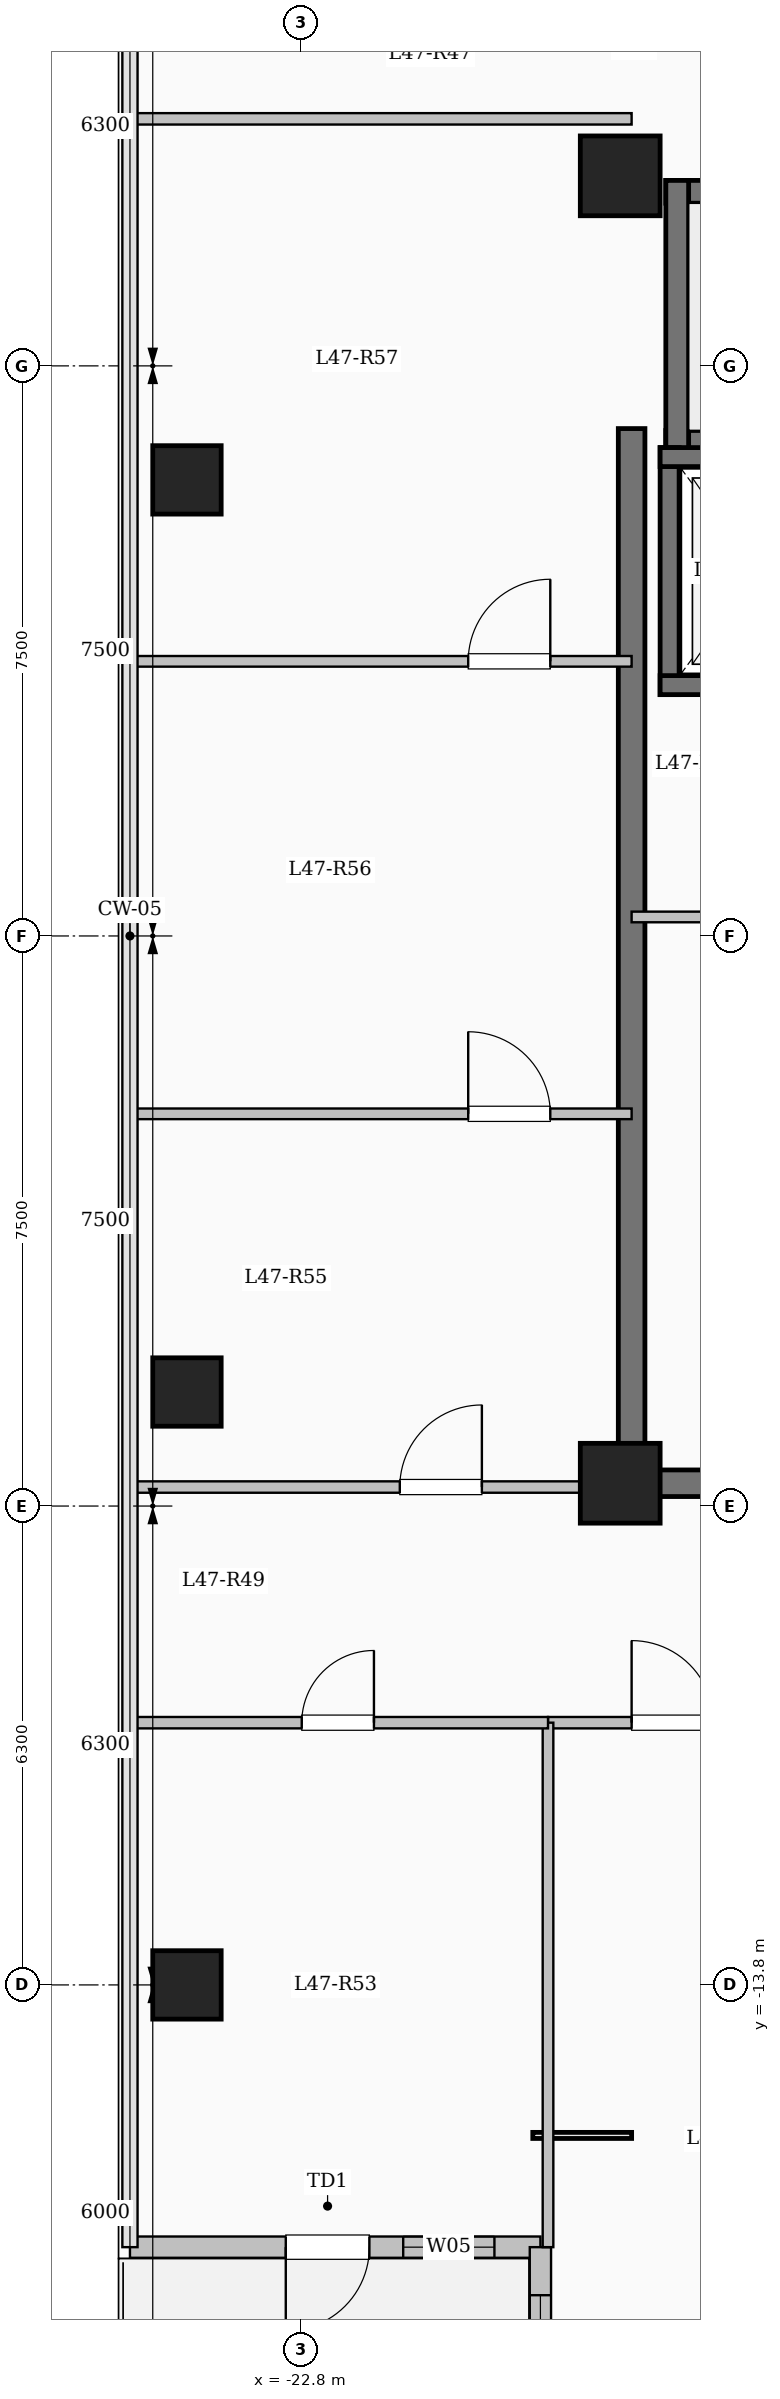
"""IFC4 building model, lengths in metres.
Left out: names, types, materials, properties, quantities, classifications, styles, units other than length and angle.
Written with IfcOpenShell. Run it as: python <this file> out.ifc"""

import sys

from ifc_helpers import new_model, si_unit, direction, frame, frame_2d, origin, origin_2d, place, context, subcontext, project, spatial, rectangle, extrude, element, fill, save


model = new_model("IFC4")
c1 = context("Model", 3, precision=1e-05, world=origin(), true_north=direction((0.0, 1.0)))
c2 = subcontext(c1, "Body", "Model", "MODEL_VIEW")
j1 = project(units=[si_unit("LENGTHUNIT", "METRE"), si_unit("PLANEANGLEUNIT", "RADIAN")], contexts=[c1])
p1 = place(None, origin())
s1 = spatial("IfcSite", under=j1, at=p1, CompositionType="ELEMENT")
p2 = place(p1, origin())
s2 = spatial("IfcBuilding", under=s1, at=p2, CompositionType="ELEMENT")
p3 = place(p2, frame((0.0, 0.0, 172.8)))
s3 = spatial("IfcBuildingStorey", under=s2, at=p3, CompositionType="ELEMENT", Elevation=172.8)
for number, where, z_axis, x_axis in (
    (1, (-18.6, -7.2, 0.0), (0.0, 0.0, 1.0), (1.0, 0.0, 0.0)),
    (2, (-18.6, 10.0, 0.0), (0.0, 0.0, 1.0), (1.0, 0.0, 0.0)),
):
    element("IfcColumn", number, at=place(p3, frame(where, z_axis=z_axis, x_axis=x_axis)), inside=s3, PredefinedType="COLUMN", context=c2, shape_type="SweptSolid", body=[
        extrude(rectangle(XDim=1.05, YDim=1.05, at=origin_2d()), origin(), (0.0, 0.0, 1.0), 4.5),
    ])
for number, where, z_axis, x_axis in (
    (3, (-24.3, -13.8, 0.0), (0.0, 0.0, 1.0), (1.0, 0.0, 0.0)),
    (4, (-24.3, -6.0, 0.0), (0.0, 0.0, 1.0), (1.0, 0.0, 0.0)),
    (5, (-24.3, 6.0, 0.0), (0.0, 0.0, 1.0), (1.0, 0.0, 0.0)),
):
    element("IfcColumn", number, at=place(p3, frame(where, z_axis=z_axis, x_axis=x_axis)), inside=s3, PredefinedType="COLUMN", context=c2, shape_type="SweptSolid", body=[
        extrude(rectangle(XDim=0.9, YDim=0.9, at=origin_2d()), origin(), (0.0, 0.0, 1.0), 4.5),
    ])
p4 = place(p3, frame((-19.65, -17.25, 0.0), z_axis=(0.0, 0.0, 1.0), x_axis=(-1.0, 0.0, 0.0)))
e6 = element("IfcWall", 6, at=p4, inside=s3, PredefinedType="SOLIDWALL", context=c2, shape_type="SweptSolid", body=[
    extrude(rectangle(XDim=5.4, YDim=0.28, at=frame_2d((2.7, 0.0))), origin(), (0.0, 0.0, 1.0), 4.2),
])
p5 = place(p4, frame((2.25, 0.0, 0.0)))
e7 = element("IfcOpeningElement", 7, at=p5, cuts=e6, PredefinedType="OPENING", context=c2, shape_type="SweptSolid", body=[
    extrude(rectangle(XDim=1.1, YDim=2.2, at=frame_2d((0.55, 1.1))), frame((0.0, 0.15, 0.0), z_axis=(0.0, -1.0, 0.0), x_axis=(1.0, 0.0, 0.0)), (0.0, 0.0, 1.0), 0.3),
])
p6 = place(p4, frame((0.605, 0.0, 0.95)))
e8 = element("IfcOpeningElement", 8, at=p6, cuts=e6, PredefinedType="OPENING", context=c2, shape_type="SweptSolid", body=[
    extrude(rectangle(XDim=1.2, YDim=1.5, at=frame_2d((0.6, 0.75))), frame((0.0, 0.15, 0.0), z_axis=(0.0, -1.0, 0.0), x_axis=(1.0, 0.0, 0.0)), (0.0, 0.0, 1.0), 0.3),
])
p7 = place(p3, frame((-19.65, -21.15, 0.0), z_axis=(0.0, 0.0, 1.0), x_axis=(0.0, 1.0, 0.0)))
e9 = element("IfcWall", 9, at=p7, inside=s3, PredefinedType="SOLIDWALL", context=c2, shape_type="SweptSolid", body=[
    extrude(rectangle(XDim=3.9, YDim=0.28, at=frame_2d((1.95, 0.0))), origin(), (0.0, 0.0, 1.0), 4.2),
])
p8 = place(p7, frame((0.668, 0.0, 0.85)))
e10 = element("IfcOpeningElement", 10, at=p8, cuts=e9, PredefinedType="OPENING", context=c2, shape_type="SweptSolid", body=[
    extrude(rectangle(XDim=2.6, YDim=2.4, at=frame_2d((1.3, 1.2))), frame((0.0, 0.15, 0.0), z_axis=(0.0, -1.0, 0.0), x_axis=(1.0, 0.0, 0.0)), (0.0, 0.0, 1.0), 0.3),
])
p9 = place(p3, frame((-18.0, 9.79, 0.0), z_axis=(0.0, 0.0, 1.0), x_axis=(1.0, 0.0, 0.0)))
e11 = element("IfcWall", 11, at=p9, inside=s3, PredefinedType="SHEAR", context=c2, shape_type="SweptSolid", body=[
    extrude(rectangle(XDim=8.0, YDim=0.3, at=frame_2d((4.0, 0.0))), origin(), (0.0, 0.0, 1.0), 4.5),
])
p10 = place(p3, frame((-18.0, 6.5, 0.0), z_axis=(0.0, 0.0, 1.0), x_axis=(1.0, 0.0, 0.0)))
e12 = element("IfcWall", 12, at=p10, inside=s3, PredefinedType="SHEAR", context=c2, shape_type="SweptSolid", body=[
    extrude(rectangle(XDim=8.0, YDim=0.3, at=frame_2d((4.0, 0.0))), origin(), (0.0, 0.0, 1.0), 4.5),
])
p11 = place(p10, frame((6.45, 0.0, 0.0)))
e13 = element("IfcOpeningElement", 13, at=p11, cuts=e12, PredefinedType="OPENING", context=c2, shape_type="SweptSolid", body=[
    extrude(rectangle(XDim=1.0, YDim=2.15, at=frame_2d((0.5, 1.075))), frame((0.0, 0.16, 0.0), z_axis=(0.0, -1.0, 0.0), x_axis=(1.0, 0.0, 0.0)), (0.0, 0.0, 1.0), 0.32),
])
p12 = place(p3, frame((-17.85, 6.35, 0.0), z_axis=(0.0, 0.0, 1.0), x_axis=(0.0, 1.0, 0.0)))
e14 = element("IfcWall", 14, at=p12, inside=s3, PredefinedType="SHEAR", context=c2, shape_type="SweptSolid", body=[
    extrude(rectangle(XDim=3.59, YDim=0.3, at=frame_2d((1.795, 0.0))), origin(), (0.0, 0.0, 1.0), 4.5),
])
p13 = place(p3, frame((-17.95, 3.175, 0.0), z_axis=(0.0, 0.0, 1.0), x_axis=(0.0, 1.0, 0.0)))
e15 = element("IfcWall", 15, at=p13, inside=s3, PredefinedType="SHEAR", context=c2, shape_type="SweptSolid", body=[
    extrude(rectangle(XDim=3.25, YDim=0.25, at=frame_2d((1.625, 0.0))), origin(), (0.0, 0.0, 1.0), 4.5),
])
for number, where, z_axis, x_axis in (
    (16, (-18.075, 3.3, 0.0), (0.0, 0.0, 1.0), (1.0, 0.0, 0.0)),
    (17, (-18.075, 6.3, 0.0), (0.0, 0.0, 1.0), (1.0, 0.0, 0.0)),
):
    element("IfcWall", number, at=place(p3, frame(where, z_axis=z_axis, x_axis=x_axis)), inside=s3, PredefinedType="SHEAR", context=c2, shape_type="SweptSolid", body=[
        extrude(rectangle(XDim=2.55, YDim=0.25, at=frame_2d((1.275, 0.0))), origin(), (0.0, 0.0, 1.0), 4.5),
    ])
p14 = place(p3, frame((-18.45, -7.375, 0.0), z_axis=(0.0, 0.0, 1.0), x_axis=(0.0, 1.0, 0.0)))
e18 = element("IfcWall", 18, at=p14, inside=s3, PredefinedType="SHEAR", context=c2, shape_type="SweptSolid", body=[
    extrude(rectangle(XDim=14.05, YDim=0.35, at=frame_2d((7.025, 0.0))), origin(), (0.0, 0.0, 1.0), 4.5),
])
p15 = place(p3, frame((-18.625, -7.2, 0.0), z_axis=(0.0, 0.0, 1.0), x_axis=(1.0, 0.0, 0.0)))
e19 = element("IfcWall", 19, at=p15, inside=s3, PredefinedType="SHEAR", context=c2, shape_type="SweptSolid", body=[
    extrude(rectangle(XDim=8.55, YDim=0.35, at=frame_2d((4.275, 0.0))), origin(), (0.0, 0.0, 1.0), 4.5),
])
p16 = place(p3, frame((-18.45, 0.25, 0.0), z_axis=(0.0, 0.0, 1.0), x_axis=(1.0, 0.0, 0.0)))
e20 = element("IfcWall", 20, at=p16, inside=s3, PredefinedType="PARTITIONING", context=c2, shape_type="SweptSolid", body=[
    extrude(rectangle(XDim=3.05, YDim=0.14, at=frame_2d((1.525, 0.0))), origin(), (0.0, 0.0, 1.0), 4.2),
])
p17 = place(p16, frame((1.05, 0.0, 0.0)))
e21 = element("IfcOpeningElement", 21, at=p17, cuts=e20, PredefinedType="OPENING", context=c2, shape_type="SweptSolid", body=[
    extrude(rectangle(XDim=0.9, YDim=2.08, at=frame_2d((0.45, 1.04))), frame((0.0, 0.08, 0.0), z_axis=(0.0, -1.0, 0.0), x_axis=(1.0, 0.0, 0.0)), (0.0, 0.0, 1.0), 0.16),
])
p18 = place(p3, frame((-19.55, -10.35, 0.0), z_axis=(0.0, 0.0, 1.0), x_axis=(1.0, 0.0, 0.0)))
e22 = element("IfcWall", 22, at=p18, inside=s3, PredefinedType="PARTITIONING", context=c2, shape_type="SweptSolid", body=[
    extrude(rectangle(XDim=11.0, YDim=0.15, at=frame_2d((5.5, 0.0))), origin(), (0.0, 0.0, 1.0), 4.2),
])
p19 = place(p18, frame((1.1, 0.0, 0.0)))
e23 = element("IfcOpeningElement", 23, at=p19, cuts=e22, PredefinedType="OPENING", context=c2, shape_type="SweptSolid", body=[
    extrude(rectangle(XDim=1.08, YDim=2.15, at=frame_2d((0.54, 1.075))), frame((0.0, 0.085, 0.0), z_axis=(0.0, -1.0, 0.0), x_axis=(1.0, 0.0, 0.0)), (0.0, 0.0, 1.0), 0.17),
])
p20 = place(p18, frame((5.718, 0.0, 0.0)))
e24 = element("IfcOpeningElement", 24, at=p20, cuts=e22, PredefinedType="OPENING", context=c2, shape_type="SweptSolid", body=[
    extrude(rectangle(XDim=1.08, YDim=2.15, at=frame_2d((0.54, 1.075))), frame((0.0, 0.085, 0.0), z_axis=(0.0, -1.0, 0.0), x_axis=(1.0, 0.0, 0.0)), (0.0, 0.0, 1.0), 0.17),
])
p21 = place(p3, frame((-25.08, -7.25, 0.0), z_axis=(0.0, 0.0, 1.0), x_axis=(1.0, 0.0, 0.0)))
e25 = element("IfcWall", 25, at=p21, inside=s3, PredefinedType="PARTITIONING", context=c2, shape_type="SweptSolid", body=[
    extrude(rectangle(XDim=6.63, YDim=0.15, at=frame_2d((3.315, 0.0))), origin(), (0.0, 0.0, 1.0), 4.2),
])
p22 = place(p21, frame((3.58, 0.0, 0.0)))
e26 = element("IfcOpeningElement", 26, at=p22, cuts=e25, PredefinedType="OPENING", context=c2, shape_type="SweptSolid", body=[
    extrude(rectangle(XDim=1.08, YDim=2.15, at=frame_2d((0.54, 1.075))), frame((0.0, 0.085, 0.0), z_axis=(0.0, -1.0, 0.0), x_axis=(1.0, 0.0, 0.0)), (0.0, 0.0, 1.0), 0.17),
])
p23 = place(p3, frame((-25.08, 10.75, 0.0), z_axis=(0.0, 0.0, 1.0), x_axis=(1.0, 0.0, 0.0)))
e27 = element("IfcWall", 27, at=p23, inside=s3, PredefinedType="PARTITIONING", context=c2, shape_type="SweptSolid", body=[
    extrude(rectangle(XDim=6.63, YDim=0.15, at=frame_2d((3.315, 0.0))), origin(), (0.0, 0.0, 1.0), 4.2),
])
p24 = place(p3, frame((-19.55, -17.25, 0.0), z_axis=(0.0, 0.0, 1.0), x_axis=(0.0, 1.0, 0.0)))
e28 = element("IfcWall", 28, at=p24, inside=s3, PredefinedType="PARTITIONING", context=c2, shape_type="SweptSolid", body=[
    extrude(rectangle(XDim=6.9, YDim=0.14, at=frame_2d((3.45, 0.0))), origin(), (0.0, 0.0, 1.0), 4.2),
])
p25 = place(p3, frame((-25.08, -10.35, 0.0), z_axis=(0.0, 0.0, 1.0), x_axis=(1.0, 0.0, 0.0)))
e29 = element("IfcWall", 29, at=p25, inside=s3, PredefinedType="PARTITIONING", context=c2, shape_type="SweptSolid", body=[
    extrude(rectangle(XDim=5.53, YDim=0.15, at=frame_2d((2.765, 0.0))), origin(), (0.0, 0.0, 1.0), 4.2),
])
p26 = place(p25, frame((2.29, 0.0, 0.0)))
e30 = element("IfcOpeningElement", 30, at=p26, cuts=e29, PredefinedType="OPENING", context=c2, shape_type="SweptSolid", body=[
    extrude(rectangle(XDim=0.95, YDim=2.15, at=frame_2d((0.475, 1.075))), frame((0.0, 0.085, 0.0), z_axis=(0.0, -1.0, 0.0), x_axis=(1.0, 0.0, 0.0)), (0.0, 0.0, 1.0), 0.17),
])
p27 = place(p3, frame((-25.08, -2.34, 0.0), z_axis=(0.0, 0.0, 1.0), x_axis=(1.0, 0.0, 0.0)))
e31 = element("IfcWall", 31, at=p27, inside=s3, PredefinedType="PARTITIONING", context=c2, shape_type="SweptSolid", body=[
    extrude(rectangle(XDim=6.63, YDim=0.14, at=frame_2d((3.315, 0.0))), origin(), (0.0, 0.0, 1.0), 4.2),
])
p28 = place(p27, frame((4.48, 0.0, 0.0)))
e32 = element("IfcOpeningElement", 32, at=p28, cuts=e31, PredefinedType="OPENING", context=c2, shape_type="SweptSolid", body=[
    extrude(rectangle(XDim=1.08, YDim=2.15, at=frame_2d((0.54, 1.075))), frame((0.0, 0.08, 0.0), z_axis=(0.0, -1.0, 0.0), x_axis=(1.0, 0.0, 0.0)), (0.0, 0.0, 1.0), 0.16),
])
p29 = place(p3, frame((-25.08, 3.613, 0.0), z_axis=(0.0, 0.0, 1.0), x_axis=(1.0, 0.0, 0.0)))
e33 = element("IfcWall", 33, at=p29, inside=s3, PredefinedType="PARTITIONING", context=c2, shape_type="SweptSolid", body=[
    extrude(rectangle(XDim=6.63, YDim=0.14, at=frame_2d((3.315, 0.0))), origin(), (0.0, 0.0, 1.0), 4.2),
])
p30 = place(p29, frame((4.48, 0.0, 0.0)))
e34 = element("IfcOpeningElement", 34, at=p30, cuts=e33, PredefinedType="OPENING", context=c2, shape_type="SweptSolid", body=[
    extrude(rectangle(XDim=1.08, YDim=2.15, at=frame_2d((0.54, 1.075))), frame((0.0, 0.08, 0.0), z_axis=(0.0, -1.0, 0.0), x_axis=(1.0, 0.0, 0.0)), (0.0, 0.0, 1.0), 0.16),
])
p31 = place(p5, origin())
e35 = element("IfcDoor", 35, at=p31, inside=s3, OperationType="SINGLE_SWING_RIGHT", PredefinedType="DOOR", context=c2, shape_type="SweptSolid", body=[
    extrude(rectangle(XDim=1.1, YDim=2.2, at=frame_2d((0.55, 1.1))), frame((0.0, 0.025, 0.0), z_axis=(0.0, -1.0, 0.0), x_axis=(1.0, 0.0, 0.0)), (0.0, 0.0, 1.0), 0.05),
])
fill(e7, e35)
p32 = place(p6, origin())
e36 = element("IfcWindow", 36, at=p32, inside=s3, PartitioningType="SINGLE_PANEL", PredefinedType="WINDOW", context=c2, shape_type="SweptSolid", body=[
    extrude(rectangle(XDim=1.2, YDim=1.5, at=frame_2d((0.6, 0.75))), frame((0.0, 0.03, 0.0), z_axis=(0.0, -1.0, 0.0), x_axis=(1.0, 0.0, 0.0)), (0.0, 0.0, 1.0), 0.06),
])
fill(e8, e36)
p33 = place(p8, origin())
e37 = element("IfcWindow", 37, at=p33, inside=s3, PartitioningType="SINGLE_PANEL", PredefinedType="WINDOW", context=c2, shape_type="SweptSolid", body=[
    extrude(rectangle(XDim=2.6, YDim=2.4, at=frame_2d((1.3, 1.2))), frame((0.0, 0.03, 0.0), z_axis=(0.0, -1.0, 0.0), x_axis=(1.0, 0.0, 0.0)), (0.0, 0.0, 1.0), 0.06),
])
fill(e10, e37)
p34 = place(p19, origin())
e38 = element("IfcDoor", 38, at=p34, inside=s3, OperationType="SINGLE_SWING_LEFT", PredefinedType="DOOR", context=c2, shape_type="SweptSolid", body=[
    extrude(rectangle(XDim=1.08, YDim=2.15, at=frame_2d((0.54, 1.075))), frame((0.0, 0.025, 0.0), z_axis=(0.0, -1.0, 0.0), x_axis=(1.0, 0.0, 0.0)), (0.0, 0.0, 1.0), 0.05),
])
fill(e23, e38)
p35 = place(p26, origin())
e39 = element("IfcDoor", 39, at=p35, inside=s3, OperationType="SINGLE_SWING_RIGHT", PredefinedType="DOOR", context=c2, shape_type="SweptSolid", body=[
    extrude(rectangle(XDim=0.95, YDim=2.15, at=frame_2d((0.475, 1.075))), frame((0.0, 0.025, 0.0), z_axis=(0.0, -1.0, 0.0), x_axis=(1.0, 0.0, 0.0)), (0.0, 0.0, 1.0), 0.05),
])
fill(e30, e39)
p36 = place(p22, origin())
e40 = element("IfcDoor", 40, at=p36, inside=s3, OperationType="SINGLE_SWING_RIGHT", PredefinedType="DOOR", context=c2, shape_type="SweptSolid", body=[
    extrude(rectangle(XDim=1.08, YDim=2.15, at=frame_2d((0.54, 1.075))), frame((0.0, 0.025, 0.0), z_axis=(0.0, -1.0, 0.0), x_axis=(1.0, 0.0, 0.0)), (0.0, 0.0, 1.0), 0.05),
])
fill(e26, e40)
p37 = place(p28, origin())
e41 = element("IfcDoor", 41, at=p37, inside=s3, OperationType="SINGLE_SWING_LEFT", PredefinedType="DOOR", context=c2, shape_type="SweptSolid", body=[
    extrude(rectangle(XDim=1.08, YDim=2.15, at=frame_2d((0.54, 1.075))), frame((0.0, 0.025, 0.0), z_axis=(0.0, -1.0, 0.0), x_axis=(1.0, 0.0, 0.0)), (0.0, 0.0, 1.0), 0.05),
])
fill(e32, e41)
p38 = place(p30, origin())
e42 = element("IfcDoor", 42, at=p38, inside=s3, OperationType="SINGLE_SWING_RIGHT", PredefinedType="DOOR", context=c2, shape_type="SweptSolid", body=[
    extrude(rectangle(XDim=1.08, YDim=2.15, at=frame_2d((0.54, 1.075))), frame((0.0, 0.025, 0.0), z_axis=(0.0, -1.0, 0.0), x_axis=(1.0, 0.0, 0.0)), (0.0, 0.0, 1.0), 0.05),
])
fill(e34, e42)
save(model, sys.argv[1])
